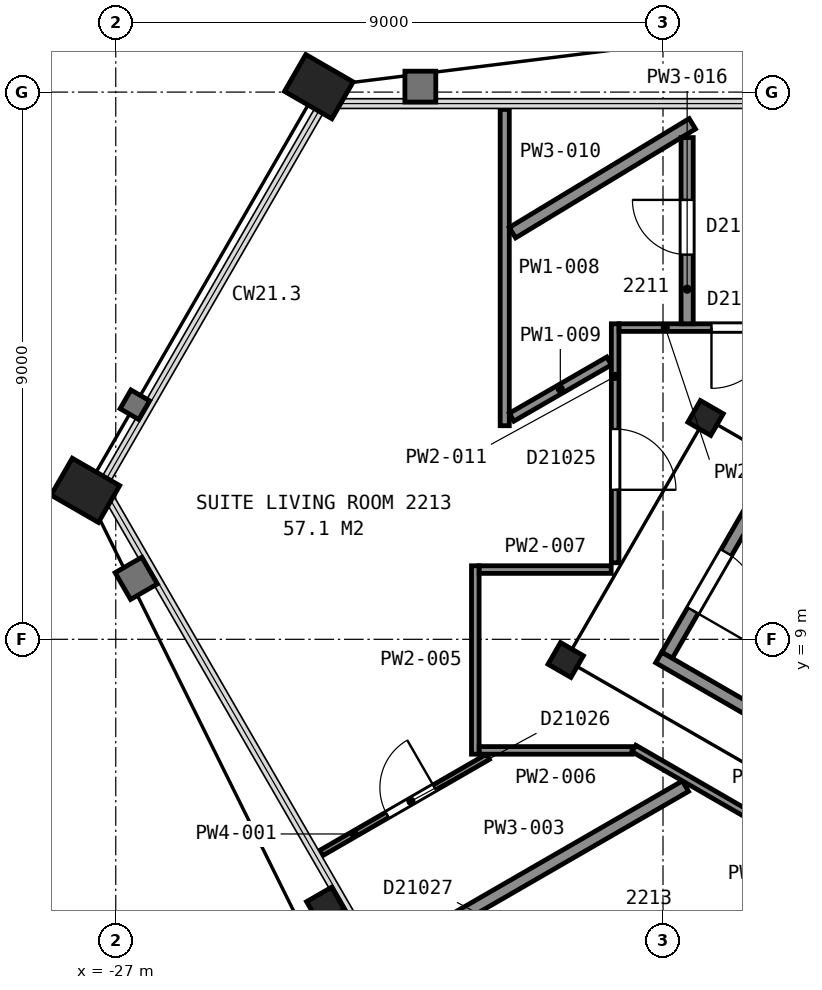
"""IFC4 building model, lengths in metres.
Left out: names, types, materials, properties, quantities, classifications, styles, units other than length and angle.
Written with IfcOpenShell. Run it as: python <this file> out.ifc"""

import sys

from ifc_helpers import new_model, si_unit, direction, frame, frame_2d, origin, origin_2d, place, context, subcontext, project, spatial, rectangle, hollow_rectangle, i_section, extrude, element, fill, save


model = new_model("IFC4")
c1 = context("Model", 3, precision=1e-05, world=origin(), true_north=direction((0.0, 1.0)))
c2 = subcontext(c1, "Body", "Model", "MODEL_VIEW")
j1 = project(units=[si_unit("LENGTHUNIT", "METRE"), si_unit("PLANEANGLEUNIT", "RADIAN")], contexts=[c1])
p1 = place(None, origin())
s1 = spatial("IfcSite", under=j1, at=p1, CompositionType="ELEMENT")
p2 = place(p1, origin())
s2 = spatial("IfcBuilding", under=s1, at=p2, CompositionType="ELEMENT")
p3 = place(p2, frame((0.0, 0.0, 96.4)))
s3 = spatial("IfcBuildingStorey", under=s2, at=p3, CompositionType="ELEMENT", Elevation=96.4)
for number, where, z_axis, x_axis in (
    (1, (-23.66, 18.09, 0.0), (0.0, 0.0, 1.0), (0.5, 0.866, 0.0)),
    (2, (-27.5, 11.45, 0.0), (0.0, 0.0, 1.0), (0.5, 0.866, 0.0)),
):
    element("IfcColumn", number, at=place(p3, frame(where, z_axis=z_axis, x_axis=x_axis)), inside=s3, PredefinedType="COLUMN", context=c2, shape_type="SweptSolid", body=[
        extrude(hollow_rectangle(XDim=0.7, YDim=0.9, WallThickness=0.065, at=origin_2d()), origin(), (0.0, 0.0, 1.0), 3.525),
    ])
p4 = place(p3, frame((-23.55, 4.62, 0.0), z_axis=(0.0, 0.0, 1.0), x_axis=(-0.5, 0.866025403784, 0.0)))
e3 = element("IfcColumn", 3, at=p4, inside=s3, PredefinedType="COLUMN", context=c2, shape_type="SweptSolid", body=[
    extrude(i_section(OverallWidth=0.424, OverallDepth=0.475, WebThickness=0.048, FlangeThickness=0.077, FilletRadius=0.015, at=origin_2d()), origin(), (0.0, 0.0, 1.0), 3.555),
])
for number, where, z_axis, x_axis in (
    (4, (-17.3, 12.64, 0.0), (0.0, 0.0, 1.0), (0.5, 0.866, 0.0)),
    (5, (-19.6, 8.66, 0.0), (0.0, 0.0, 1.0), (0.5, 0.866, 0.0)),
):
    element("IfcColumn", number, at=place(p3, frame(where, z_axis=z_axis, x_axis=x_axis)), inside=s3, PredefinedType="COLUMN", context=c2, shape_type="SweptSolid", body=[
        extrude(i_section(OverallWidth=0.411, OverallDepth=0.434, WebThickness=0.036, FlangeThickness=0.057, FilletRadius=0.015, at=origin_2d()), origin(), (0.0, 0.0, 1.0), 3.6),
    ])
p5 = place(p3, frame((-16.534, 11.162, 0.0), z_axis=(0.0, 0.0, 1.0), x_axis=(-0.49998411664, -0.866034573852, 0.0)))
e6 = element("IfcWall", 6, at=p5, inside=s3, PredefinedType="PARTITIONING", context=c2, shape_type="SweptSolid", body=[
    extrude(rectangle(XDim=2.8, YDim=0.2, at=frame_2d((1.4, 0.0))), origin(), (0.0, 0.0, 1.0), 3.35),
])
p6 = place(p5, frame((0.85, 0.0, 0.0)))
e7 = element("IfcOpeningElement", 7, at=p6, cuts=e6, PredefinedType="OPENING", context=c2, shape_type="SweptSolid", body=[
    extrude(rectangle(XDim=1.1, YDim=2.1, at=frame_2d((0.55, 1.05))), frame((0.0, 0.11, 0.0), z_axis=(0.0, -1.0, 0.0), x_axis=(1.0, 0.0, 0.0)), (0.0, 0.0, 1.0), 0.22),
])
p7 = place(p3, frame((-7.678, 2.701, 0.0), z_axis=(0.0, 0.0, 1.0), x_axis=(-0.866026010844, 0.49999894854, 0.0)))
e8 = element("IfcWall", 8, at=p7, inside=s3, PredefinedType="PARTITIONING", context=c2, shape_type="SweptSolid", body=[
    extrude(rectangle(XDim=12.0, YDim=0.2, at=frame_2d((6.0, 0.0))), origin(), (0.0, 0.0, 1.0), 3.35),
])
p8 = place(p3, frame((-20.88, 7.067, 0.0), z_axis=(0.0, 0.0, 1.0), x_axis=(-0.866127794624, -0.499822611913, 0.0)))
e9 = element("IfcWall", 9, at=p8, inside=s3, PredefinedType="PARTITIONING", context=c2, shape_type="SweptSolid", body=[
    extrude(rectangle(XDim=3.165, YDim=0.1, at=frame_2d((1.583, 0.0))), origin(), (0.0, 0.0, 1.0), 2.613),
])
p9 = place(p8, frame((1.011, 0.0, 0.0)))
e10 = element("IfcOpeningElement", 10, at=p9, cuts=e9, PredefinedType="OPENING", context=c2, shape_type="SweptSolid", body=[
    extrude(rectangle(XDim=0.9, YDim=2.1, at=frame_2d((0.45, 1.05))), frame((0.0, 0.06, 0.0), z_axis=(0.0, -1.0, 0.0), x_axis=(1.0, 0.0, 0.0)), (0.0, 0.0, 1.0), 0.12),
])
p10 = place(p3, frame((-21.565, 4.314, 0.0), z_axis=(0.0, 0.0, 1.0), x_axis=(0.866058501026, 0.499942669514, 0.0)))
e11 = element("IfcWall", 11, at=p10, inside=s3, PredefinedType="PARTITIONING", context=c2, shape_type="SweptSolid", body=[
    extrude(rectangle(XDim=4.542, YDim=0.2, at=frame_2d((2.271, 0.0))), origin(), (0.0, 0.0, 1.0), 2.613),
])
p11 = place(p3, frame((-21.301, 1.464, 0.0), z_axis=(0.0, 0.0, 1.0), x_axis=(0.866055299146, 0.49994821614, 0.0)))
e12 = element("IfcWall", 12, at=p11, inside=s3, PredefinedType="PARTITIONING", context=c2, shape_type="SweptSolid", body=[
    extrude(rectangle(XDim=7.052, YDim=0.15, at=frame_2d((3.526, 0.0))), origin(), (0.0, 0.0, 1.0), 2.613),
])
p12 = place(p3, frame((-21.087, 7.111, 0.0), z_axis=(0.0, 0.0, 1.0), x_axis=(0.0, 1.0, 0.0)))
e13 = element("IfcWall", 13, at=p12, inside=s3, PredefinedType="PARTITIONING", context=c2, shape_type="SweptSolid", body=[
    extrude(rectangle(XDim=3.099, YDim=0.125, at=frame_2d((1.549, 0.0))), origin(), (0.0, 0.0, 1.0), 2.613),
])
p13 = place(p3, frame((-21.022, 7.173, 0.0), z_axis=(0.0, 0.0, 1.0), x_axis=(1.0, 0.0, 0.0)))
e14 = element("IfcWall", 14, at=p13, inside=s3, PredefinedType="PARTITIONING", context=c2, shape_type="SweptSolid", body=[
    extrude(rectangle(XDim=2.513, YDim=0.125, at=frame_2d((1.256, 0.0))), origin(), (0.0, 0.0, 1.0), 2.613),
])
p14 = place(p3, frame((-21.022, 10.147, 0.0), z_axis=(0.0, 0.0, 1.0), x_axis=(1.0, 0.0, 0.0)))
e15 = element("IfcWall", 15, at=p14, inside=s3, PredefinedType="PARTITIONING", context=c2, shape_type="SweptSolid", body=[
    extrude(rectangle(XDim=2.17, YDim=0.125, at=frame_2d((1.085, 0.0))), origin(), (0.0, 0.0, 1.0), 2.613),
])
p15 = place(p3, frame((-20.603, 12.513, 0.0), z_axis=(0.0, 0.0, 1.0), x_axis=(0.0, 1.0, 0.0)))
e16 = element("IfcWall", 16, at=p15, inside=s3, PredefinedType="PARTITIONING", context=c2, shape_type="SweptSolid", body=[
    extrude(rectangle(XDim=5.202, YDim=0.15, at=frame_2d((2.601, 0.0))), origin(), (0.0, 0.0, 1.0), 2.613),
])
p16 = place(p3, frame((-20.49, 12.653, 0.0), z_axis=(0.0, 0.0, 1.0), x_axis=(0.866141673836, 0.499798560267, 0.0)))
e17 = element("IfcWall", 17, at=p16, inside=s3, PredefinedType="PARTITIONING", context=c2, shape_type="SweptSolid", body=[
    extrude(rectangle(XDim=1.851, YDim=0.15, at=frame_2d((0.926, 0.0))), origin(), (0.0, 0.0, 1.0), 2.613),
])
p17 = place(p3, frame((-20.476, 15.688, 0.0), z_axis=(0.0, 0.0, 1.0), x_axis=(0.855493496237, 0.517813555148, 0.0)))
e18 = element("IfcWall", 18, at=p17, inside=s3, PredefinedType="PARTITIONING", context=c2, shape_type="SweptSolid", body=[
    extrude(rectangle(XDim=3.459, YDim=0.2, at=frame_2d((1.729, 0.0))), origin(), (0.0, 0.0, 1.0), 2.613),
])
p18 = place(p3, frame((-18.787, 10.259, 0.0), z_axis=(0.0, 0.0, 1.0), x_axis=(0.0, 1.0, 0.0)))
e19 = element("IfcWall", 19, at=p18, inside=s3, PredefinedType="PARTITIONING", context=c2, shape_type="SweptSolid", body=[
    extrude(rectangle(XDim=3.93, YDim=0.125, at=frame_2d((1.965, 0.0))), origin(), (0.0, 0.0, 1.0), 2.613),
])
p19 = place(p18, frame((1.2, 0.0, 0.0)))
e20 = element("IfcOpeningElement", 20, at=p19, cuts=e19, PredefinedType="OPENING", context=c2, shape_type="SweptSolid", body=[
    extrude(rectangle(XDim=1.0, YDim=2.1, at=frame_2d((0.5, 1.05))), frame((0.0, 0.073, 0.0), z_axis=(0.0, -1.0, 0.0), x_axis=(1.0, 0.0, 0.0)), (0.0, 0.0, 1.0), 0.145),
])
p20 = place(p3, frame((-18.722, 14.127, 0.0), z_axis=(0.0, 0.0, 1.0), x_axis=(1.0, 0.0, 0.0)))
e21 = element("IfcWall", 21, at=p20, inside=s3, PredefinedType="PARTITIONING", context=c2, shape_type="SweptSolid", body=[
    extrude(rectangle(XDim=2.971, YDim=0.125, at=frame_2d((1.486, 0.0))), origin(), (0.0, 0.0, 1.0), 2.613),
])
p21 = place(p20, frame((1.519, 0.0, 0.0)))
e22 = element("IfcOpeningElement", 22, at=p21, cuts=e21, PredefinedType="OPENING", context=c2, shape_type="SweptSolid", body=[
    extrude(rectangle(XDim=1.0, YDim=2.1, at=frame_2d((0.5, 1.05))), frame((0.0, 0.073, 0.0), z_axis=(0.0, -1.0, 0.0), x_axis=(1.0, 0.0, 0.0)), (0.0, 0.0, 1.0), 0.145),
])
p22 = place(p3, frame((-18.478, 7.204, 0.0), z_axis=(0.0, 0.0, 1.0), x_axis=(0.866011320536, -0.500024392108, 0.0)))
e23 = element("IfcWall", 23, at=p22, inside=s3, PredefinedType="PARTITIONING", context=c2, shape_type="SweptSolid", body=[
    extrude(rectangle(XDim=3.663, YDim=0.125, at=frame_2d((1.832, 0.0))), origin(), (0.0, 0.0, 1.0), 2.613),
])
p23 = place(p3, frame((-17.603, 14.189, 0.0), z_axis=(0.0, 0.0, 1.0), x_axis=(0.0, 1.0, 0.0)))
e24 = element("IfcWall", 24, at=p23, inside=s3, PredefinedType="PARTITIONING", context=c2, shape_type="SweptSolid", body=[
    extrude(rectangle(XDim=3.062, YDim=0.2, at=frame_2d((1.531, 0.0))), origin(), (0.0, 0.0, 1.0), 2.613),
])
p24 = place(p23, frame((1.137, 0.0, 0.0)))
e25 = element("IfcOpeningElement", 25, at=p24, cuts=e24, PredefinedType="OPENING", context=c2, shape_type="SweptSolid", body=[
    extrude(rectangle(XDim=0.9, YDim=2.1, at=frame_2d((0.45, 1.05))), frame((0.0, 0.11, 0.0), z_axis=(0.0, -1.0, 0.0), x_axis=(1.0, 0.0, 0.0)), (0.0, 0.0, 1.0), 0.22),
])
p25 = place(p6, origin())
e26 = element("IfcDoor", 26, at=p25, inside=s3, OperationType="SINGLE_SWING_RIGHT", PredefinedType="DOOR", context=c2, shape_type="SweptSolid", body=[
    extrude(rectangle(XDim=1.1, YDim=2.1, at=frame_2d((0.55, 1.05))), frame((0.0, 0.025, 0.0), z_axis=(0.0, -1.0, 0.0), x_axis=(1.0, 0.0, 0.0)), (0.0, 0.0, 1.0), 0.05),
])
fill(e7, e26)
p26 = place(p9, origin())
e27 = element("IfcDoor", 27, at=p26, inside=s3, OperationType="SINGLE_SWING_LEFT", PredefinedType="DOOR", context=c2, shape_type="SweptSolid", body=[
    extrude(rectangle(XDim=0.9, YDim=2.1, at=frame_2d((0.45, 1.05))), frame((0.0, 0.025, 0.0), z_axis=(0.0, -1.0, 0.0), x_axis=(1.0, 0.0, 0.0)), (0.0, 0.0, 1.0), 0.05),
])
fill(e10, e27)
p27 = place(p19, origin())
e28 = element("IfcDoor", 28, at=p27, inside=s3, OperationType="SINGLE_SWING_LEFT", PredefinedType="DOOR", context=c2, shape_type="SweptSolid", body=[
    extrude(rectangle(XDim=1.0, YDim=2.1, at=frame_2d((0.5, 1.05))), frame((0.0, 0.025, 0.0), z_axis=(0.0, -1.0, 0.0), x_axis=(1.0, 0.0, 0.0)), (0.0, 0.0, 1.0), 0.05),
])
fill(e20, e28)
p28 = place(p21, origin())
e29 = element("IfcDoor", 29, at=p28, inside=s3, OperationType="SINGLE_SWING_LEFT", PredefinedType="DOOR", context=c2, shape_type="SweptSolid", body=[
    extrude(rectangle(XDim=1.0, YDim=2.1, at=frame_2d((0.5, 1.05))), frame((0.0, 0.025, 0.0), z_axis=(0.0, -1.0, 0.0), x_axis=(1.0, 0.0, 0.0)), (0.0, 0.0, 1.0), 0.05),
])
fill(e22, e29)
p29 = place(p24, origin())
e30 = element("IfcDoor", 30, at=p29, inside=s3, OperationType="SINGLE_SWING_RIGHT", PredefinedType="DOOR", context=c2, shape_type="SweptSolid", body=[
    extrude(rectangle(XDim=0.9, YDim=2.1, at=frame_2d((0.45, 1.05))), frame((0.0, 0.025, 0.0), z_axis=(0.0, -1.0, 0.0), x_axis=(1.0, 0.0, 0.0)), (0.0, 0.0, 1.0), 0.05),
])
fill(e25, e30)
save(model, sys.argv[1])
